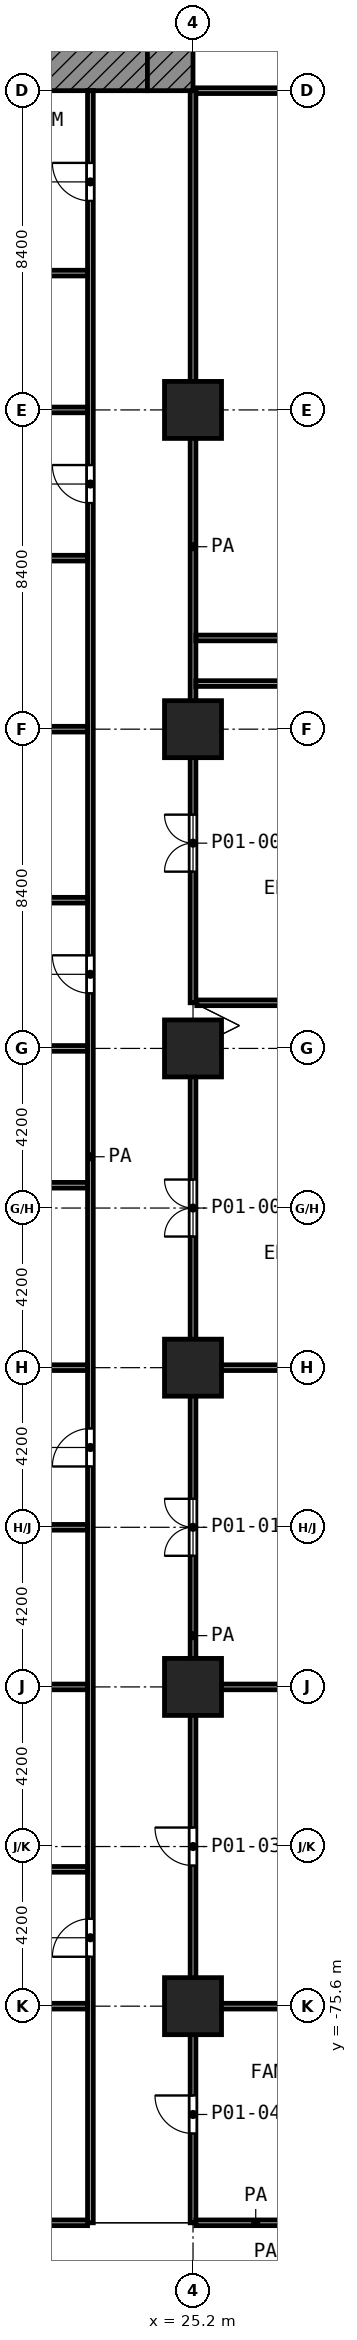
"""IFC4 building model, lengths in metres.
Left out: names, types, materials, properties, quantities, classifications, styles, units other than length and angle.
Written with IfcOpenShell. Run it as: python <this file> out.ifc"""

import sys

from ifc_helpers import new_model, si_unit, direction, frame, frame_2d, origin, origin_2d, place, context, subcontext, project, spatial, rectangle, extrude, element, fill, save


model = new_model("IFC4")
c1 = context("Model", 3, precision=1e-05, world=origin(), true_north=direction((0.0, 1.0)))
c2 = subcontext(c1, "Body", "Model", "MODEL_VIEW")
j1 = project(units=[si_unit("LENGTHUNIT", "METRE"), si_unit("PLANEANGLEUNIT", "RADIAN")], contexts=[c1])
p1 = place(None, origin())
s1 = spatial("IfcSite", under=j1, at=p1, CompositionType="ELEMENT")
p2 = place(p1, origin())
s2 = spatial("IfcBuilding", under=s1, at=p2, CompositionType="ELEMENT")
p3 = place(p2, origin())
s3 = spatial("IfcBuildingStorey", under=s2, at=p3, CompositionType="ELEMENT", Elevation=0.0)
for number, where, z_axis, x_axis in (
    (1, (25.2, -33.6, 0.0), (0.0, 0.0, 1.0), (1.0, 0.0, 0.0)),
    (2, (25.2, -42.0, 0.0), (0.0, 0.0, 1.0), (1.0, 0.0, 0.0)),
    (3, (25.2, -50.4, 0.0), (0.0, 0.0, 1.0), (1.0, 0.0, 0.0)),
    (4, (25.2, -58.8, 0.0), (0.0, 0.0, 1.0), (1.0, 0.0, 0.0)),
    (5, (25.2, -67.2, 0.0), (0.0, 0.0, 1.0), (1.0, 0.0, 0.0)),
    (6, (25.2, -75.6, 0.0), (0.0, 0.0, 1.0), (1.0, 0.0, 0.0)),
):
    element("IfcColumn", number, at=place(p3, frame(where, z_axis=z_axis, x_axis=x_axis)), inside=s3, PredefinedType="COLUMN", context=c2, shape_type="SweptSolid", body=[
        extrude(rectangle(XDim=1.5, YDim=1.5, at=origin_2d()), origin(), (0.0, 0.0, 1.0), 7.0),
    ])
p4 = place(p3, frame((5.4, -24.6, 0.0), z_axis=(0.0, 0.0, 1.0), x_axis=(1.0, 0.0, 0.0)))
e7 = element("IfcWall", 7, at=p4, inside=s3, PredefinedType="SHEAR", context=c2, shape_type="SweptSolid", body=[
    extrude(rectangle(XDim=18.6, YDim=1.2, at=frame_2d((9.3, 0.0))), origin(), (0.0, 0.0, 1.0), 6.65),
])
p5 = place(p4, frame((6.3, 0.0, 0.0)))
e8 = element("IfcOpeningElement", 8, at=p5, cuts=e7, PredefinedType="OPENING", context=c2, shape_type="SweptSolid", body=[
    extrude(rectangle(XDim=1.8, YDim=2.1, at=frame_2d((0.9, 1.05))), frame((0.0, 0.61, 0.0), z_axis=(0.0, -1.0, 0.0), x_axis=(1.0, 0.0, 0.0)), (0.0, 0.0, 1.0), 1.22),
])
p6 = place(p3, frame((24.6, -25.2, 0.0), z_axis=(0.0, 0.0, 1.0), x_axis=(0.0, 1.0, 0.0)))
e9 = element("IfcWall", 9, at=p6, inside=s3, PredefinedType="SHEAR", context=c2, shape_type="SweptSolid", body=[
    extrude(rectangle(XDim=1.2, YDim=1.2, at=frame_2d((0.6, 0.0))), origin(), (0.0, 0.0, 1.0), 6.65),
])
p7 = place(p3, frame((11.175, -81.3, 0.0), z_axis=(0.0, 0.0, 1.0), x_axis=(1.0, 0.0, 0.0)))
e10 = element("IfcWall", 10, at=p7, inside=s3, PredefinedType="PARTITIONING", context=c2, shape_type="SweptSolid", body=[
    extrude(rectangle(XDim=11.25, YDim=0.15, at=frame_2d((5.625, 0.0))), origin(), (0.0, 0.0, 1.0), 6.65),
])
p8 = place(p7, frame((5.125, 0.0, 0.0)))
e11 = element("IfcOpeningElement", 11, at=p8, cuts=e10, PredefinedType="OPENING", context=c2, shape_type="SweptSolid", body=[
    extrude(rectangle(XDim=1.0, YDim=2.1, at=frame_2d((0.5, 1.05))), frame((0.0, 0.085, 0.0), z_axis=(0.0, -1.0, 0.0), x_axis=(1.0, 0.0, 0.0)), (0.0, 0.0, 1.0), 0.17),
])
p9 = place(p3, frame((25.275, -81.3, 0.0), z_axis=(0.0, 0.0, 1.0), x_axis=(1.0, 0.0, 0.0)))
e12 = element("IfcWall", 12, at=p9, inside=s3, PredefinedType="PARTITIONING", context=c2, shape_type="SweptSolid", body=[
    extrude(rectangle(XDim=3.15, YDim=0.15, at=frame_2d((1.575, 0.0))), origin(), (0.0, 0.0, 1.0), 6.65),
])
p10 = place(p3, frame((11.175, -75.6, 0.0), z_axis=(0.0, 0.0, 1.0), x_axis=(1.0, 0.0, 0.0)))
e13 = element("IfcWall", 13, at=p10, inside=s3, PredefinedType="PARTITIONING", context=c2, shape_type="SweptSolid", body=[
    extrude(rectangle(XDim=11.25, YDim=0.15, at=frame_2d((5.625, 0.0))), origin(), (0.0, 0.0, 1.0), 6.65),
])
p11 = place(p3, frame((25.275, -75.6, 0.0), z_axis=(0.0, 0.0, 1.0), x_axis=(1.0, 0.0, 0.0)))
e14 = element("IfcWall", 14, at=p11, inside=s3, PredefinedType="PARTITIONING", context=c2, shape_type="SweptSolid", body=[
    extrude(rectangle(XDim=8.145, YDim=0.15, at=frame_2d((4.073, 0.0))), origin(), (0.0, 0.0, 1.0), 5.25),
])
for number, where, z_axis, x_axis in (
    (15, (11.175, -72.0, 0.0), (0.0, 0.0, 1.0), (1.0, 0.0, 0.0)),
    (16, (11.175, -67.2, 0.0), (0.0, 0.0, 1.0), (1.0, 0.0, 0.0)),
):
    element("IfcWall", number, at=place(p3, frame(where, z_axis=z_axis, x_axis=x_axis)), inside=s3, PredefinedType="PARTITIONING", context=c2, shape_type="SweptSolid", body=[
        extrude(rectangle(XDim=11.25, YDim=0.15, at=frame_2d((5.625, 0.0))), origin(), (0.0, 0.0, 1.0), 6.65),
    ])
p12 = place(p3, frame((25.275, -67.2, 0.0), z_axis=(0.0, 0.0, 1.0), x_axis=(1.0, 0.0, 0.0)))
e17 = element("IfcWall", 17, at=p12, inside=s3, PredefinedType="PARTITIONING", context=c2, shape_type="SweptSolid", body=[
    extrude(rectangle(XDim=8.145, YDim=0.15, at=frame_2d((4.073, 0.0))), origin(), (0.0, 0.0, 1.0), 6.65),
])
for number, where, z_axis, x_axis in (
    (18, (11.175, -63.0, 0.0), (0.0, 0.0, 1.0), (1.0, 0.0, 0.0)),
    (19, (11.175, -58.8, 0.0), (0.0, 0.0, 1.0), (1.0, 0.0, 0.0)),
):
    element("IfcWall", number, at=place(p3, frame(where, z_axis=z_axis, x_axis=x_axis)), inside=s3, PredefinedType="PARTITIONING", context=c2, shape_type="SweptSolid", body=[
        extrude(rectangle(XDim=11.25, YDim=0.15, at=frame_2d((5.625, 0.0))), origin(), (0.0, 0.0, 1.0), 6.65),
    ])
p13 = place(p3, frame((25.275, -58.8, 0.0), z_axis=(0.0, 0.0, 1.0), x_axis=(1.0, 0.0, 0.0)))
e20 = element("IfcWall", 20, at=p13, inside=s3, PredefinedType="PARTITIONING", context=c2, shape_type="SweptSolid", body=[
    extrude(rectangle(XDim=8.145, YDim=0.15, at=frame_2d((4.073, 0.0))), origin(), (0.0, 0.0, 1.0), 6.65),
])
for number, where, z_axis, x_axis in (
    (21, (11.175, -54.0, 0.0), (0.0, 0.0, 1.0), (1.0, 0.0, 0.0)),
    (22, (11.175, -50.4, 0.0), (0.0, 0.0, 1.0), (1.0, 0.0, 0.0)),
):
    element("IfcWall", number, at=place(p3, frame(where, z_axis=z_axis, x_axis=x_axis)), inside=s3, PredefinedType="PARTITIONING", context=c2, shape_type="SweptSolid", body=[
        extrude(rectangle(XDim=11.25, YDim=0.15, at=frame_2d((5.625, 0.0))), origin(), (0.0, 0.0, 1.0), 6.65),
    ])
p14 = place(p3, frame((25.299, -49.2, 0.0), z_axis=(0.0, 0.0, 1.0), x_axis=(1.0, 0.0, 0.0)))
e23 = element("IfcWall", 23, at=p14, inside=s3, PredefinedType="PARTITIONING", context=c2, shape_type="SweptSolid", body=[
    extrude(rectangle(XDim=8.121, YDim=0.15, at=frame_2d((4.061, 0.0))), origin(), (0.0, 0.0, 1.0), 5.25),
])
for number, where, z_axis, x_axis in (
    (24, (11.175, -46.5, 0.0), (0.0, 0.0, 1.0), (1.0, 0.0, 0.0)),
    (25, (11.175, -42.0, 0.0), (0.0, 0.0, 1.0), (1.0, 0.0, 0.0)),
):
    element("IfcWall", number, at=place(p3, frame(where, z_axis=z_axis, x_axis=x_axis)), inside=s3, PredefinedType="PARTITIONING", context=c2, shape_type="SweptSolid", body=[
        extrude(rectangle(XDim=11.25, YDim=0.15, at=frame_2d((5.625, 0.0))), origin(), (0.0, 0.0, 1.0), 6.65),
    ])
p15 = place(p3, frame((25.275, -40.8, 0.0), z_axis=(0.0, 0.0, 1.0), x_axis=(1.0, 0.0, 0.0)))
e26 = element("IfcWall", 26, at=p15, inside=s3, PredefinedType="PARTITIONING", context=c2, shape_type="SweptSolid", body=[
    extrude(rectangle(XDim=8.145, YDim=0.15, at=frame_2d((4.073, 0.0))), origin(), (0.0, 0.0, 1.0), 5.25),
])
p16 = place(p15, frame((3.375, 0.0, 0.0)))
e27 = element("IfcOpeningElement", 27, at=p16, cuts=e26, PredefinedType="OPENING", context=c2, shape_type="SweptSolid", body=[
    extrude(rectangle(XDim=1.5, YDim=2.1, at=frame_2d((0.75, 1.05))), frame((0.0, 0.085, 0.0), z_axis=(0.0, -1.0, 0.0), x_axis=(1.0, 0.0, 0.0)), (0.0, 0.0, 1.0), 0.17),
])
p17 = place(p3, frame((25.275, -39.6, 0.0), z_axis=(0.0, 0.0, 1.0), x_axis=(1.0, 0.0, 0.0)))
e28 = element("IfcWall", 28, at=p17, inside=s3, PredefinedType="PARTITIONING", context=c2, shape_type="SweptSolid", body=[
    extrude(rectangle(XDim=8.325, YDim=0.15, at=frame_2d((4.163, 0.0))), origin(), (0.0, 0.0, 1.0), 6.65),
])
for number, where, z_axis, x_axis in (
    (29, (11.175, -37.5, 0.0), (0.0, 0.0, 1.0), (1.0, 0.0, 0.0)),
    (30, (11.175, -33.6, 0.0), (0.0, 0.0, 1.0), (1.0, 0.0, 0.0)),
    (31, (11.175, -30.0, 0.0), (0.0, 0.0, 1.0), (1.0, 0.0, 0.0)),
):
    element("IfcWall", number, at=place(p3, frame(where, z_axis=z_axis, x_axis=x_axis)), inside=s3, PredefinedType="PARTITIONING", context=c2, shape_type="SweptSolid", body=[
        extrude(rectangle(XDim=11.25, YDim=0.15, at=frame_2d((5.625, 0.0))), origin(), (0.0, 0.0, 1.0), 6.65),
    ])
p18 = place(p3, frame((25.275, -25.2, 0.0), z_axis=(0.0, 0.0, 1.0), x_axis=(1.0, 0.0, 0.0)))
e32 = element("IfcWall", 32, at=p18, inside=s3, PredefinedType="PARTITIONING", context=c2, shape_type="SweptSolid", body=[
    extrude(rectangle(XDim=32.325, YDim=0.15, at=frame_2d((16.163, 0.0))), origin(), (0.0, 0.0, 1.0), 6.65),
])
p19 = place(p18, frame((18.975, 0.0, 0.0)))
e33 = element("IfcOpeningElement", 33, at=p19, cuts=e32, PredefinedType="OPENING", context=c2, shape_type="SweptSolid", body=[
    extrude(rectangle(XDim=1.5, YDim=2.1, at=frame_2d((0.75, 1.05))), frame((0.0, 0.085, 0.0), z_axis=(0.0, -1.0, 0.0), x_axis=(1.0, 0.0, 0.0)), (0.0, 0.0, 1.0), 0.17),
])
p20 = place(p18, frame((5.975, 0.0, 0.0)))
e34 = element("IfcOpeningElement", 34, at=p20, cuts=e32, PredefinedType="OPENING", context=c2, shape_type="SweptSolid", body=[
    extrude(rectangle(XDim=1.5, YDim=2.1, at=frame_2d((0.75, 1.05))), frame((0.0, 0.085, 0.0), z_axis=(0.0, -1.0, 0.0), x_axis=(1.0, 0.0, 0.0)), (0.0, 0.0, 1.0), 0.17),
])
p21 = place(p18, frame((27.025, 0.0, 0.0)))
e35 = element("IfcOpeningElement", 35, at=p21, cuts=e32, PredefinedType="OPENING", context=c2, shape_type="SweptSolid", body=[
    extrude(rectangle(XDim=1.0, YDim=2.1, at=frame_2d((0.5, 1.05))), frame((0.0, 0.085, 0.0), z_axis=(0.0, -1.0, 0.0), x_axis=(1.0, 0.0, 0.0)), (0.0, 0.0, 1.0), 0.17),
])
p22 = place(p18, frame((30.625, 0.0, 0.0)))
e36 = element("IfcOpeningElement", 36, at=p22, cuts=e32, PredefinedType="OPENING", context=c2, shape_type="SweptSolid", body=[
    extrude(rectangle(XDim=1.0, YDim=2.1, at=frame_2d((0.5, 1.05))), frame((0.0, 0.085, 0.0), z_axis=(0.0, -1.0, 0.0), x_axis=(1.0, 0.0, 0.0)), (0.0, 0.0, 1.0), 0.17),
])
p23 = place(p3, frame((22.5, -81.3, 0.0), z_axis=(0.0, 0.0, 1.0), x_axis=(0.0, 1.0, 0.0)))
e37 = element("IfcWall", 37, at=p23, inside=s3, PredefinedType="PARTITIONING", context=c2, shape_type="SweptSolid", body=[
    extrude(rectangle(XDim=56.1, YDim=0.15, at=frame_2d((28.05, 0.0))), origin(), (0.0, 0.0, 1.0), 6.65),
])
p24 = place(p23, frame((53.2, 0.0, 0.0)))
e38 = element("IfcOpeningElement", 38, at=p24, cuts=e37, PredefinedType="OPENING", context=c2, shape_type="SweptSolid", body=[
    extrude(rectangle(XDim=1.0, YDim=2.1, at=frame_2d((0.5, 1.05))), frame((0.0, 0.085, 0.0), z_axis=(0.0, -1.0, 0.0), x_axis=(1.0, 0.0, 0.0)), (0.0, 0.0, 1.0), 0.17),
])
p25 = place(p23, frame((45.25, 0.0, 0.0)))
e39 = element("IfcOpeningElement", 39, at=p25, cuts=e37, PredefinedType="OPENING", context=c2, shape_type="SweptSolid", body=[
    extrude(rectangle(XDim=1.0, YDim=2.1, at=frame_2d((0.5, 1.05))), frame((0.0, 0.085, 0.0), z_axis=(0.0, -1.0, 0.0), x_axis=(1.0, 0.0, 0.0)), (0.0, 0.0, 1.0), 0.17),
])
p26 = place(p23, frame((32.35, 0.0, 0.0)))
e40 = element("IfcOpeningElement", 40, at=p26, cuts=e37, PredefinedType="OPENING", context=c2, shape_type="SweptSolid", body=[
    extrude(rectangle(XDim=1.0, YDim=2.1, at=frame_2d((0.5, 1.05))), frame((0.0, 0.085, 0.0), z_axis=(0.0, -1.0, 0.0), x_axis=(1.0, 0.0, 0.0)), (0.0, 0.0, 1.0), 0.17),
])
p27 = place(p23, frame((19.9, 0.0, 0.0)))
e41 = element("IfcOpeningElement", 41, at=p27, cuts=e37, PredefinedType="OPENING", context=c2, shape_type="SweptSolid", body=[
    extrude(rectangle(XDim=1.0, YDim=2.1, at=frame_2d((0.5, 1.05))), frame((0.0, 0.085, 0.0), z_axis=(0.0, -1.0, 0.0), x_axis=(1.0, 0.0, 0.0)), (0.0, 0.0, 1.0), 0.17),
])
p28 = place(p23, frame((7.0, 0.0, 0.0)))
e42 = element("IfcOpeningElement", 42, at=p28, cuts=e37, PredefinedType="OPENING", context=c2, shape_type="SweptSolid", body=[
    extrude(rectangle(XDim=1.0, YDim=2.1, at=frame_2d((0.5, 1.05))), frame((0.0, 0.085, 0.0), z_axis=(0.0, -1.0, 0.0), x_axis=(1.0, 0.0, 0.0)), (0.0, 0.0, 1.0), 0.17),
])
p29 = place(p3, frame((25.2, -81.3, 0.0), z_axis=(0.0, 0.0, 1.0), x_axis=(0.0, 1.0, 0.0)))
e43 = element("IfcWall", 43, at=p29, inside=s3, PredefinedType="PARTITIONING", context=c2, shape_type="SweptSolid", body=[
    extrude(rectangle(XDim=30.899, YDim=0.15, at=frame_2d((15.45, 0.0))), origin(), (0.0, 0.0, 1.0), 6.65),
])
p30 = place(p29, frame((25.95, 0.0, 0.0)))
e44 = element("IfcOpeningElement", 44, at=p30, cuts=e43, PredefinedType="OPENING", context=c2, shape_type="SweptSolid", body=[
    extrude(rectangle(XDim=1.5, YDim=2.1, at=frame_2d((0.75, 1.05))), frame((0.0, 0.085, 0.0), z_axis=(0.0, -1.0, 0.0), x_axis=(1.0, 0.0, 0.0)), (0.0, 0.0, 1.0), 0.17),
])
p31 = place(p29, frame((17.55, 0.0, 0.0)))
e45 = element("IfcOpeningElement", 45, at=p31, cuts=e43, PredefinedType="OPENING", context=c2, shape_type="SweptSolid", body=[
    extrude(rectangle(XDim=1.5, YDim=2.1, at=frame_2d((0.75, 1.05))), frame((0.0, 0.085, 0.0), z_axis=(0.0, -1.0, 0.0), x_axis=(1.0, 0.0, 0.0)), (0.0, 0.0, 1.0), 0.17),
])
p32 = place(p29, frame((9.4, 0.0, 0.0)))
e46 = element("IfcOpeningElement", 46, at=p32, cuts=e43, PredefinedType="OPENING", context=c2, shape_type="SweptSolid", body=[
    extrude(rectangle(XDim=1.0, YDim=2.1, at=frame_2d((0.5, 1.05))), frame((0.0, 0.085, 0.0), z_axis=(0.0, -1.0, 0.0), x_axis=(1.0, 0.0, 0.0)), (0.0, 0.0, 1.0), 0.17),
])
p33 = place(p29, frame((2.35, 0.0, 0.0)))
e47 = element("IfcOpeningElement", 47, at=p33, cuts=e43, PredefinedType="OPENING", context=c2, shape_type="SweptSolid", body=[
    extrude(rectangle(XDim=1.0, YDim=2.1, at=frame_2d((0.5, 1.05))), frame((0.0, 0.085, 0.0), z_axis=(0.0, -1.0, 0.0), x_axis=(1.0, 0.0, 0.0)), (0.0, 0.0, 1.0), 0.17),
])
p34 = place(p3, frame((25.2, -49.199, 0.0), z_axis=(0.0, 0.0, 1.0), x_axis=(0.0, 1.0, 0.0)))
e48 = element("IfcWall", 48, at=p34, inside=s3, PredefinedType="PARTITIONING", context=c2, shape_type="SweptSolid", body=[
    extrude(rectangle(XDim=23.999, YDim=0.15, at=frame_2d((12.0, 0.0))), origin(), (0.0, 0.0, 1.0), 6.65),
])
p35 = place(p34, frame((3.45, 0.0, 0.0)))
e49 = element("IfcOpeningElement", 49, at=p35, cuts=e48, PredefinedType="OPENING", context=c2, shape_type="SweptSolid", body=[
    extrude(rectangle(XDim=1.5, YDim=2.1, at=frame_2d((0.75, 1.05))), frame((0.0, 0.085, 0.0), z_axis=(0.0, -1.0, 0.0), x_axis=(1.0, 0.0, 0.0)), (0.0, 0.0, 1.0), 0.17),
])
p36 = place(p35, origin())
e50 = element("IfcDoor", 50, at=p36, inside=s3, OperationType="DOUBLE_DOOR_SINGLE_SWING", PredefinedType="DOOR", context=c2, shape_type="SweptSolid", body=[
    extrude(rectangle(XDim=1.5, YDim=2.1, at=frame_2d((0.75, 1.05))), frame((0.0, 0.025, 0.0), z_axis=(0.0, -1.0, 0.0), x_axis=(1.0, 0.0, 0.0)), (0.0, 0.0, 1.0), 0.05),
])
fill(e49, e50)
p37 = place(p30, origin())
e51 = element("IfcDoor", 51, at=p37, inside=s3, OperationType="DOUBLE_DOOR_SINGLE_SWING", PredefinedType="DOOR", context=c2, shape_type="SweptSolid", body=[
    extrude(rectangle(XDim=1.5, YDim=2.1, at=frame_2d((0.75, 1.05))), frame((0.0, 0.025, 0.0), z_axis=(0.0, -1.0, 0.0), x_axis=(1.0, 0.0, 0.0)), (0.0, 0.0, 1.0), 0.05),
])
fill(e44, e51)
p38 = place(p24, origin())
e52 = element("IfcDoor", 52, at=p38, inside=s3, OperationType="SINGLE_SWING_RIGHT", PredefinedType="DOOR", context=c2, shape_type="SweptSolid", body=[
    extrude(rectangle(XDim=1.0, YDim=2.1, at=frame_2d((0.5, 1.05))), frame((0.0, 0.025, 0.0), z_axis=(0.0, -1.0, 0.0), x_axis=(1.0, 0.0, 0.0)), (0.0, 0.0, 1.0), 0.05),
])
fill(e38, e52)
p39 = place(p25, origin())
e53 = element("IfcDoor", 53, at=p39, inside=s3, OperationType="SINGLE_SWING_RIGHT", PredefinedType="DOOR", context=c2, shape_type="SweptSolid", body=[
    extrude(rectangle(XDim=1.0, YDim=2.1, at=frame_2d((0.5, 1.05))), frame((0.0, 0.025, 0.0), z_axis=(0.0, -1.0, 0.0), x_axis=(1.0, 0.0, 0.0)), (0.0, 0.0, 1.0), 0.05),
])
fill(e39, e53)
p40 = place(p26, origin())
e54 = element("IfcDoor", 54, at=p40, inside=s3, OperationType="SINGLE_SWING_RIGHT", PredefinedType="DOOR", context=c2, shape_type="SweptSolid", body=[
    extrude(rectangle(XDim=1.0, YDim=2.1, at=frame_2d((0.5, 1.05))), frame((0.0, 0.025, 0.0), z_axis=(0.0, -1.0, 0.0), x_axis=(1.0, 0.0, 0.0)), (0.0, 0.0, 1.0), 0.05),
])
fill(e40, e54)
p41 = place(p27, origin())
e55 = element("IfcDoor", 55, at=p41, inside=s3, OperationType="SINGLE_SWING_LEFT", PredefinedType="DOOR", context=c2, shape_type="SweptSolid", body=[
    extrude(rectangle(XDim=1.0, YDim=2.1, at=frame_2d((0.5, 1.05))), frame((0.0, 0.025, 0.0), z_axis=(0.0, -1.0, 0.0), x_axis=(1.0, 0.0, 0.0)), (0.0, 0.0, 1.0), 0.05),
])
fill(e41, e55)
p42 = place(p28, origin())
e56 = element("IfcDoor", 56, at=p42, inside=s3, OperationType="SINGLE_SWING_LEFT", PredefinedType="DOOR", context=c2, shape_type="SweptSolid", body=[
    extrude(rectangle(XDim=1.0, YDim=2.1, at=frame_2d((0.5, 1.05))), frame((0.0, 0.025, 0.0), z_axis=(0.0, -1.0, 0.0), x_axis=(1.0, 0.0, 0.0)), (0.0, 0.0, 1.0), 0.05),
])
fill(e42, e56)
p43 = place(p31, origin())
e57 = element("IfcDoor", 57, at=p43, inside=s3, OperationType="DOUBLE_DOOR_SINGLE_SWING", PredefinedType="DOOR", context=c2, shape_type="SweptSolid", body=[
    extrude(rectangle(XDim=1.5, YDim=2.1, at=frame_2d((0.75, 1.05))), frame((0.0, 0.025, 0.0), z_axis=(0.0, -1.0, 0.0), x_axis=(1.0, 0.0, 0.0)), (0.0, 0.0, 1.0), 0.05),
])
fill(e45, e57)
p44 = place(p32, origin())
e58 = element("IfcDoor", 58, at=p44, inside=s3, OperationType="SINGLE_SWING_RIGHT", PredefinedType="DOOR", context=c2, shape_type="SweptSolid", body=[
    extrude(rectangle(XDim=1.0, YDim=2.1, at=frame_2d((0.5, 1.05))), frame((0.0, 0.025, 0.0), z_axis=(0.0, -1.0, 0.0), x_axis=(1.0, 0.0, 0.0)), (0.0, 0.0, 1.0), 0.05),
])
fill(e46, e58)
p45 = place(p33, origin())
e59 = element("IfcDoor", 59, at=p45, inside=s3, OperationType="SINGLE_SWING_RIGHT", PredefinedType="DOOR", context=c2, shape_type="SweptSolid", body=[
    extrude(rectangle(XDim=1.0, YDim=2.1, at=frame_2d((0.5, 1.05))), frame((0.0, 0.025, 0.0), z_axis=(0.0, -1.0, 0.0), x_axis=(1.0, 0.0, 0.0)), (0.0, 0.0, 1.0), 0.05),
])
fill(e47, e59)
save(model, sys.argv[1])
